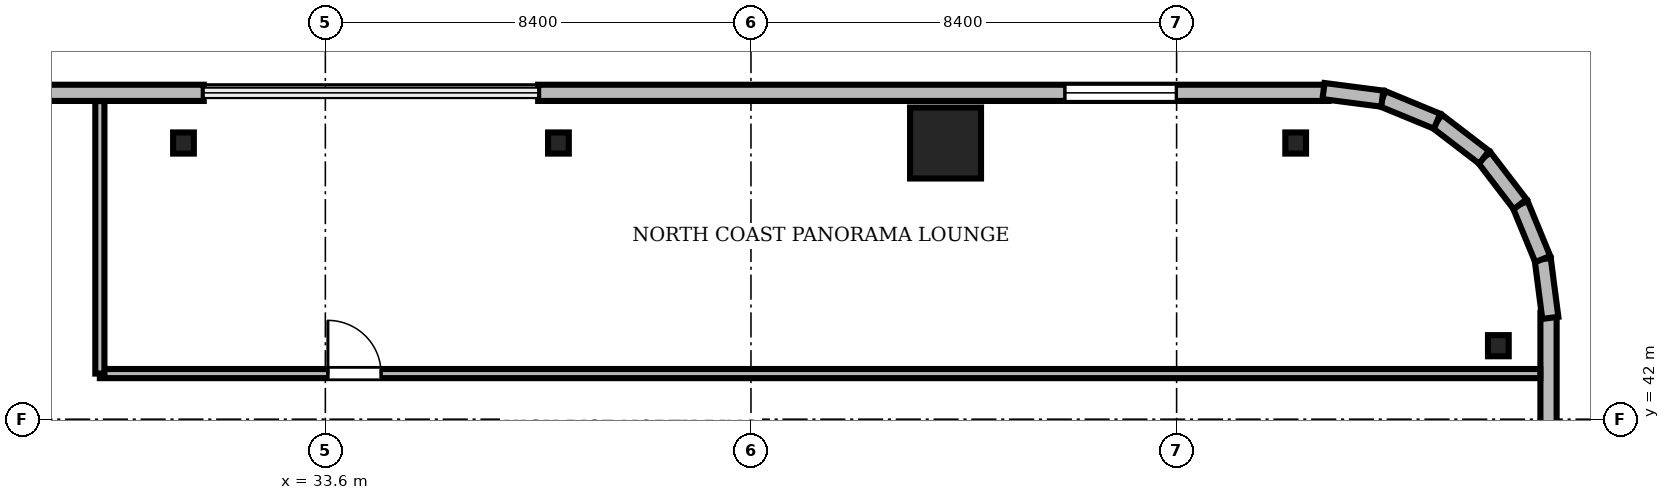
"""IFC4 building model, lengths in metres.
Left out: names, types, materials, properties, quantities, classifications, styles, units other than length and angle.
Written with IfcOpenShell. Run it as: python <this file> out.ifc"""

import sys

from ifc_helpers import new_model, si_unit, direction, frame, frame_2d, origin, origin_2d, place, context, subcontext, project, spatial, rectangle, i_section, extrude, source, transform, mapped, element, fill, save


model = new_model("IFC4")
c1 = context("Model", 3, precision=1e-05, world=origin(), true_north=direction((0.0, 1.0)))
c2 = subcontext(c1, "Body", "Model", "MODEL_VIEW")
j1 = project(units=[si_unit("LENGTHUNIT", "METRE"), si_unit("PLANEANGLEUNIT", "RADIAN")], contexts=[c1])
p1 = place(None, origin())
s1 = spatial("IfcSite", under=j1, at=p1, CompositionType="ELEMENT")
p2 = place(p1, origin())
s2 = spatial("IfcBuilding", under=s1, at=p2, CompositionType="ELEMENT")
p3 = place(p2, frame((0.0, 0.0, 207.3)))
s3 = spatial("IfcBuildingStorey", under=s2, at=p3, CompositionType="ELEMENT", Elevation=207.3)
m1 = source(origin(), c2, "Body", "SweptSolid", [
    extrude(rectangle(XDim=1.4, YDim=1.4, at=origin_2d()), origin(), (0.0, 0.0, 1.0), 3.53),
])
p4 = place(p3, frame((45.84, 47.45, 0.0), z_axis=(0.0, 0.0, 1.0), x_axis=(1.0, 0.0, 0.0)))
e1 = element("IfcColumn", 1, at=p4, inside=s3, PredefinedType="COLUMN", context=c2, shape_type="MappedRepresentation", body=[
    mapped(m1, transform((0.0, 0.0, 0.0), scale=1.0)),
])
m2 = source(origin(), c2, "Body", "SweptSolid", [
    extrude(i_section(OverallWidth=0.409, OverallDepth=0.417, WebThickness=0.021, FlangeThickness=0.033, FilletRadius=0.015, at=origin_2d()), origin(), (0.0, 0.0, 1.0), 3.53),
])
for number, where, z_axis, x_axis in (
    (2, (56.75, 43.45, 0.0), (0.0, 0.0, 1.0), (1.0, 0.0, 0.0)),
    (3, (52.75, 47.45, 0.0), (0.0, 0.0, 1.0), (1.0, 0.0, 0.0)),
    (4, (38.2, 47.45, 0.0), (0.0, 0.0, 1.0), (1.0, 0.0, 0.0)),
    (5, (30.8, 47.45, 0.0), (0.0, 0.0, 1.0), (1.0, 0.0, 0.0)),
):
    element("IfcColumn", number, at=place(p3, frame(where, z_axis=z_axis, x_axis=x_axis)), inside=s3, PredefinedType="COLUMN", context=c2, shape_type="MappedRepresentation", body=[
        mapped(m2, transform((0.0, 0.0, 0.0), scale=1.0)),
    ])
m3 = source(origin(), c2, "Body", "SweptSolid", [
    extrude(rectangle(XDim=15.6, YDim=0.32, at=frame_2d((7.8, 0.0))), origin(), (0.0, 0.0, 1.0), 3.53),
])
p5 = place(p3, frame((53.4, 48.44, 0.0), z_axis=(0.0, 0.0, 1.0), x_axis=(-1.0, 0.0, 0.0)))
e6 = element("IfcWall", 6, at=p5, inside=s3, PredefinedType="SOLIDWALL", context=c2, shape_type="MappedRepresentation", body=[
    mapped(m3, transform((0.0, 0.0, 0.0), scale=1.0)),
])
m4 = source(origin(), c2, "Body", "SweptSolid", [
    extrude(rectangle(XDim=2.2, YDim=2.4, at=frame_2d((1.1, 1.2))), frame((0.0, 0.17, 0.0), z_axis=(0.0, -1.0, 0.0), x_axis=(1.0, 0.0, 0.0)), (0.0, 0.0, 1.0), 0.34),
])
p6 = place(p5, frame((3.005, 0.0, 0.72)))
e7 = element("IfcOpeningElement", 7, at=p6, cuts=e6, PredefinedType="OPENING", context=c2, shape_type="MappedRepresentation", body=[
    mapped(m4, transform((0.0, 0.0, 0.0), scale=1.0)),
])
p7 = place(p3, frame((31.2, 48.44, 0.0), z_axis=(0.0, 0.0, 1.0), x_axis=(-1.0, 0.0, 0.0)))
e8 = element("IfcWall", 8, at=p7, inside=s3, PredefinedType="SOLIDWALL", context=c2, shape_type="MappedRepresentation", body=[
    mapped(m3, transform((0.0, 0.0, 0.0), scale=1.0)),
])
m5 = source(origin(), c2, "Body", "SweptSolid", [
    extrude(rectangle(XDim=1.4, YDim=2.3, at=frame_2d((0.7, 1.15))), frame((0.0, 0.17, 0.0), z_axis=(0.0, -1.0, 0.0), x_axis=(1.0, 0.0, 0.0)), (0.0, 0.0, 1.0), 0.34),
])
p8 = place(p7, frame((4.59, 0.0, 0.0)))
e9 = element("IfcOpeningElement", 9, at=p8, cuts=e8, PredefinedType="OPENING", context=c2, shape_type="MappedRepresentation", body=[
    mapped(m5, transform((0.0, 0.0, 0.0), scale=1.0)),
])
p9 = place(p7, frame((10.395, 0.0, 0.72)))
e10 = element("IfcOpeningElement", 10, at=p9, cuts=e8, PredefinedType="OPENING", context=c2, shape_type="MappedRepresentation", body=[
    mapped(m4, transform((0.0, 0.0, 0.0), scale=1.0)),
])
m6 = source(origin(), c2, "Body", "SweptSolid", [
    extrude(rectangle(XDim=15.6, YDim=0.32, at=frame_2d((7.8, 0.0))), origin(), (0.0, 0.0, 1.0), 3.53),
])
p10 = place(p3, frame((57.74, 28.5, 0.0), z_axis=(0.0, 0.0, 1.0), x_axis=(0.0, 1.0, 0.0)))
e11 = element("IfcWall", 11, at=p10, inside=s3, PredefinedType="SOLIDWALL", context=c2, shape_type="MappedRepresentation", body=[
    mapped(m6, transform((0.0, 0.0, 0.0), scale=1.0)),
])
p11 = place(p10, frame((10.395, 0.0, 0.72)))
e12 = element("IfcOpeningElement", 12, at=p11, cuts=e11, PredefinedType="OPENING", context=c2, shape_type="MappedRepresentation", body=[
    mapped(m4, transform((0.0, 0.0, 0.0), scale=1.0)),
])
m7 = source(origin(), c2, "Body", "SweptSolid", [
    extrude(rectangle(XDim=1.17, YDim=0.32, at=frame_2d((0.585, 0.0))), origin(), (0.0, 0.0, 1.0), 3.53),
])
p12 = place(p3, frame((57.776, 44.0, 0.0), z_axis=(0.0, 0.0, 1.0), x_axis=(-0.128295670475, 0.991735963317, 0.0)))
e13 = element("IfcWall", 13, at=p12, inside=s3, PredefinedType="SOLIDWALL", context=c2, shape_type="MappedRepresentation", body=[
    mapped(m7, transform((0.0, 0.0, 0.0), scale=1.0)),
])
m8 = source(origin(), c2, "Body", "SweptSolid", [
    extrude(rectangle(XDim=1.169, YDim=0.32, at=frame_2d((0.584, 0.0))), origin(), (0.0, 0.0, 1.0), 3.53),
])
p13 = place(p3, frame((57.625, 45.16, 0.0), z_axis=(0.0, 0.0, 1.0), x_axis=(-0.381054331552, 0.924552646638, 0.0)))
e14 = element("IfcWall", 14, at=p13, inside=s3, PredefinedType="SOLIDWALL", context=c2, shape_type="MappedRepresentation", body=[
    mapped(m8, transform((0.0, 0.0, 0.0), scale=1.0)),
])
m9 = source(origin(), c2, "Body", "SweptSolid", [
    extrude(rectangle(XDim=1.169, YDim=0.32, at=frame_2d((0.584, 0.0))), origin(), (0.0, 0.0, 1.0), 3.53),
])
p14 = place(p3, frame((57.18, 46.241, 0.0), z_axis=(0.0, 0.0, 1.0), x_axis=(-0.608387696831, 0.793639975269, 0.0)))
e15 = element("IfcWall", 15, at=p14, inside=s3, PredefinedType="SOLIDWALL", context=c2, shape_type="MappedRepresentation", body=[
    mapped(m9, transform((0.0, 0.0, 0.0), scale=1.0)),
])
m10 = source(origin(), c2, "Body", "SweptSolid", [
    extrude(rectangle(XDim=1.169, YDim=0.32, at=frame_2d((0.584, 0.0))), origin(), (0.0, 0.0, 1.0), 3.53),
])
p15 = place(p3, frame((56.469, 47.169, 0.0), z_axis=(0.0, 0.0, 1.0), x_axis=(-0.793663520347, 0.608356981114, 0.0)))
e16 = element("IfcWall", 16, at=p15, inside=s3, PredefinedType="SOLIDWALL", context=c2, shape_type="MappedRepresentation", body=[
    mapped(m10, transform((0.0, 0.0, 0.0), scale=1.0)),
])
p16 = place(p3, frame((55.541, 47.88, 0.0), z_axis=(0.0, 0.0, 1.0), x_axis=(-0.924552646638, 0.381054331552, 0.0)))
e17 = element("IfcWall", 17, at=p16, inside=s3, PredefinedType="SOLIDWALL", context=c2, shape_type="MappedRepresentation", body=[
    mapped(m8, transform((0.0, 0.0, 0.0), scale=1.0)),
])
p17 = place(p3, frame((54.46, 48.325, 0.0), z_axis=(0.0, 0.0, 1.0), x_axis=(-0.991735963317, 0.128295670475, 0.0)))
e18 = element("IfcWall", 18, at=p17, inside=s3, PredefinedType="SOLIDWALL", context=c2, shape_type="MappedRepresentation", body=[
    mapped(m7, transform((0.0, 0.0, 0.0), scale=1.0)),
])
m11 = source(origin(), c2, "Body", "SweptSolid", [
    extrude(rectangle(XDim=28.428, YDim=0.18, at=frame_2d((14.214, 0.0))), origin(), (0.0, 0.0, 1.0), 2.772),
])
p18 = place(p3, frame((29.15, 42.9, 0.0), z_axis=(0.0, 0.0, 1.0), x_axis=(1.0, 0.0, 0.0)))
e19 = element("IfcWall", 19, at=p18, inside=s3, PredefinedType="PARTITIONING", context=c2, shape_type="MappedRepresentation", body=[
    mapped(m11, transform((0.0, 0.0, 0.0), scale=1.0)),
])
m12 = source(origin(), c2, "Body", "SweptSolid", [
    extrude(rectangle(XDim=1.05, YDim=2.2, at=frame_2d((0.525, 1.1))), frame((0.0, 0.1, 0.0), z_axis=(0.0, -1.0, 0.0), x_axis=(1.0, 0.0, 0.0)), (0.0, 0.0, 1.0), 0.2),
])
p19 = place(p18, frame((4.5, 0.0, 0.0)))
e20 = element("IfcOpeningElement", 20, at=p19, cuts=e19, PredefinedType="OPENING", context=c2, shape_type="MappedRepresentation", body=[
    mapped(m12, transform((0.0, 0.0, 0.0), scale=1.0)),
])
m13 = source(origin(), c2, "Body", "SweptSolid", [
    extrude(rectangle(XDim=5.378, YDim=0.18, at=frame_2d((2.689, 0.0))), origin(), (0.0, 0.0, 1.0), 2.772),
])
p20 = place(p3, frame((29.15, 42.9, 0.0), z_axis=(0.0, 0.0, 1.0), x_axis=(0.0, 1.0, 0.0)))
e21 = element("IfcWall", 21, at=p20, inside=s3, PredefinedType="PARTITIONING", context=c2, shape_type="MappedRepresentation", body=[
    mapped(m13, transform((0.0, 0.0, 0.0), scale=1.0)),
])
m14 = source(origin(), c2, "Body", "SweptSolid", [
    extrude(rectangle(XDim=2.2, YDim=2.4, at=frame_2d((1.1, 1.2))), frame((0.0, 0.03, 0.0), z_axis=(0.0, -1.0, 0.0), x_axis=(1.0, 0.0, 0.0)), (0.0, 0.0, 1.0), 0.06),
])
p21 = place(p6, origin())
e22 = element("IfcWindow", 22, at=p21, inside=s3, PartitioningType="SINGLE_PANEL", PredefinedType="WINDOW", context=c2, shape_type="MappedRepresentation", body=[
    mapped(m14, transform((0.0, 0.0, 0.0), scale=1.0)),
])
fill(e7, e22)
m15 = source(origin(), c2, "Body", "SweptSolid", [
    extrude(rectangle(XDim=1.05, YDim=2.2, at=frame_2d((0.525, 1.1))), frame((0.0, 0.025, 0.0), z_axis=(0.0, -1.0, 0.0), x_axis=(1.0, 0.0, 0.0)), (0.0, 0.0, 1.0), 0.05),
])
p22 = place(p19, origin())
e23 = element("IfcDoor", 23, at=p22, inside=s3, OperationType="SINGLE_SWING_LEFT", PredefinedType="DOOR", context=c2, shape_type="MappedRepresentation", body=[
    mapped(m15, transform((0.0, 0.0, 0.0), scale=1.0)),
])
fill(e20, e23)
save(model, sys.argv[1])
